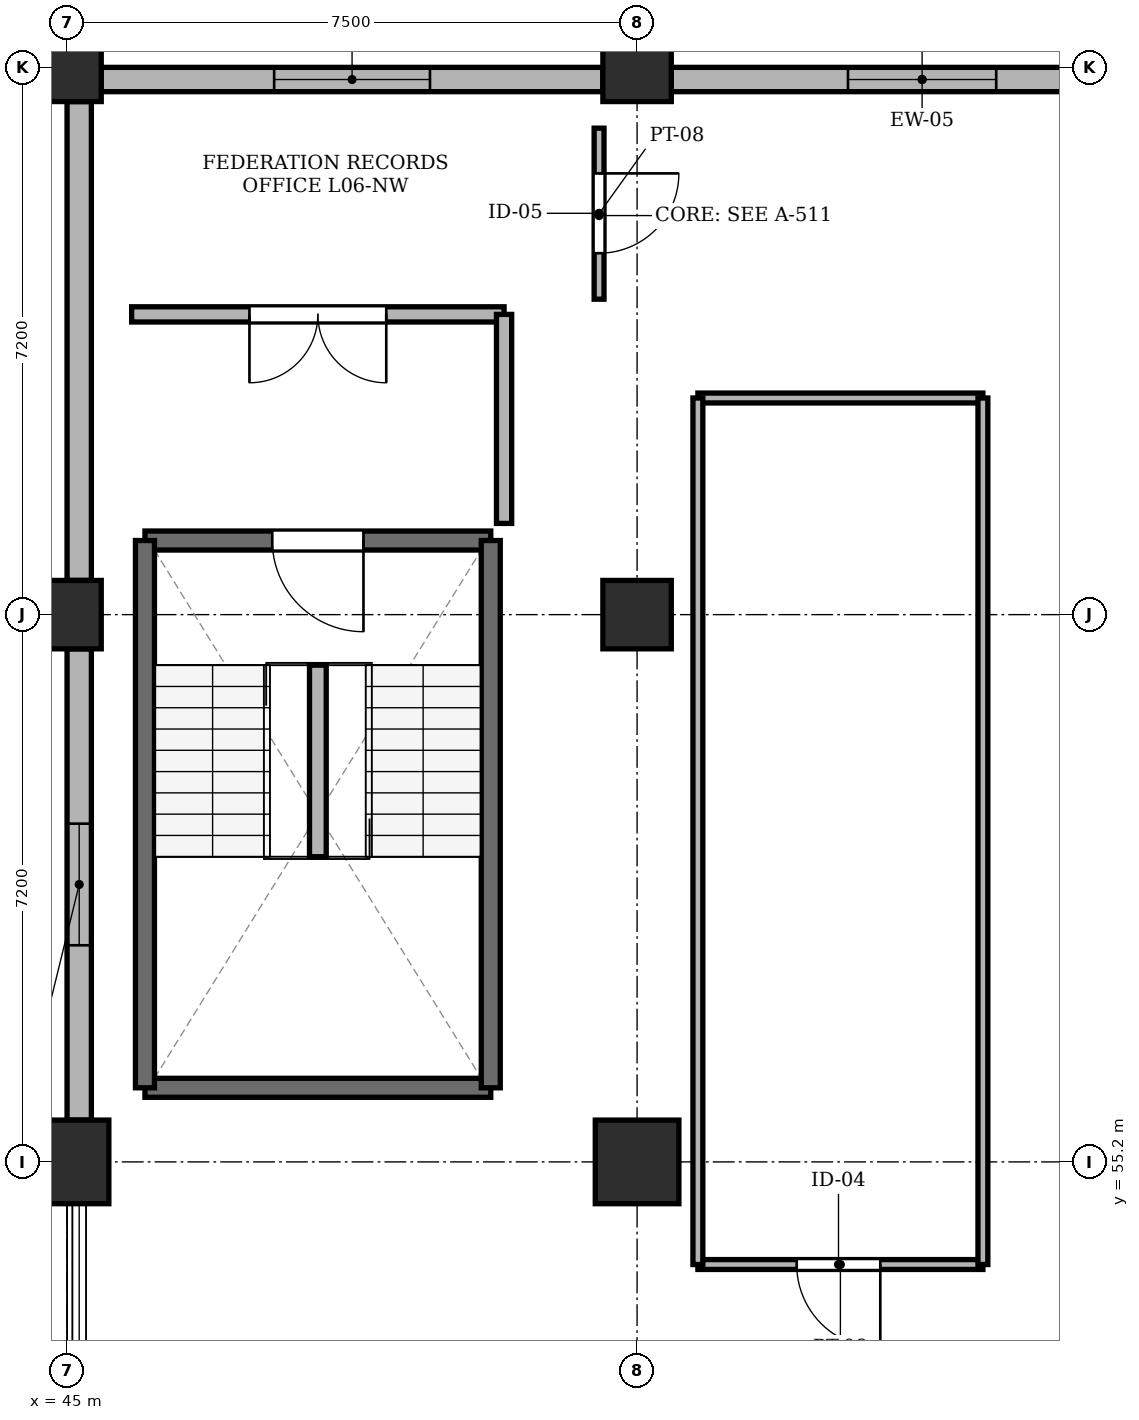
"""IFC4 building model, lengths in metres.
Left out: names, types, materials, properties, quantities, classifications, styles, units other than length and angle.
Written with IfcOpenShell. Run it as: python <this file> out.ifc"""

import sys

from ifc_helpers import new_model, si_unit, direction, frame, frame_2d, origin, origin_2d, place, context, subcontext, project, spatial, rectangle, extrude, element, fill, save


model = new_model("IFC4")
c1 = context("Model", 3, precision=1e-05, world=origin(), true_north=direction((0.0, 1.0)))
c2 = subcontext(c1, "Body", "Model", "MODEL_VIEW")
j1 = project(units=[si_unit("LENGTHUNIT", "METRE"), si_unit("PLANEANGLEUNIT", "RADIAN")], contexts=[c1])
p1 = place(None, origin())
s1 = spatial("IfcSite", under=j1, at=p1, CompositionType="ELEMENT")
p2 = place(p1, origin())
s2 = spatial("IfcBuilding", under=s1, at=p2, CompositionType="ELEMENT")
p3 = place(p2, frame((0.0, 0.0, 30.8)))
s3 = spatial("IfcBuildingStorey", under=s2, at=p3, CompositionType="ELEMENT", Elevation=30.8)
p4 = place(p3, frame((45.0, 55.2, -0.26), z_axis=(0.0, 0.0, 1.0), x_axis=(1.0, 0.0, 0.0)))
e1 = element("IfcColumn", 1, at=p4, inside=s3, PredefinedType="COLUMN", context=c2, shape_type="SweptSolid", body=[
    extrude(rectangle(XDim=1.1, YDim=1.1, at=origin_2d()), origin(), (0.0, 0.0, 1.0), 3.26),
])
for number, where, z_axis, x_axis in (
    (2, (45.0, 62.4, -0.26), (0.0, 0.0, 1.0), (1.0, 0.0, 0.0)),
    (3, (45.0, 69.6, -0.26), (0.0, 0.0, 1.0), (1.0, 0.0, 0.0)),
):
    element("IfcColumn", number, at=place(p3, frame(where, z_axis=z_axis, x_axis=x_axis)), inside=s3, PredefinedType="COLUMN", context=c2, shape_type="SweptSolid", body=[
        extrude(rectangle(XDim=0.9, YDim=0.9, at=origin_2d()), origin(), (0.0, 0.0, 1.0), 3.26),
    ])
p5 = place(p3, frame((52.5, 55.2, -0.26), z_axis=(0.0, 0.0, 1.0), x_axis=(1.0, 0.0, 0.0)))
e4 = element("IfcColumn", 4, at=p5, inside=s3, PredefinedType="COLUMN", context=c2, shape_type="SweptSolid", body=[
    extrude(rectangle(XDim=1.1, YDim=1.1, at=origin_2d()), origin(), (0.0, 0.0, 1.0), 3.26),
])
for number, where, z_axis, x_axis in (
    (5, (52.5, 62.4, -0.26), (0.0, 0.0, 1.0), (1.0, 0.0, 0.0)),
    (6, (52.5, 69.6, -0.26), (0.0, 0.0, 1.0), (1.0, 0.0, 0.0)),
):
    element("IfcColumn", number, at=place(p3, frame(where, z_axis=z_axis, x_axis=x_axis)), inside=s3, PredefinedType="COLUMN", context=c2, shape_type="SweptSolid", body=[
        extrude(rectangle(XDim=0.9, YDim=0.9, at=origin_2d()), origin(), (0.0, 0.0, 1.0), 3.26),
    ])
p6 = place(p3, frame((59.55, 69.44, 0.0), z_axis=(0.0, 0.0, 1.0), x_axis=(-1.0, 0.0, 0.0)))
e7 = element("IfcWall", 7, at=p6, inside=s3, PredefinedType="SOLIDWALL", context=c2, shape_type="SweptSolid", body=[
    extrude(rectangle(XDim=6.6, YDim=0.32, at=frame_2d((3.3, 0.0))), origin(), (0.0, 0.0, 1.0), 2.53),
])
p7 = place(p6, frame((2.325, 0.0, 0.62)))
e8 = element("IfcOpeningElement", 8, at=p7, cuts=e7, PredefinedType="OPENING", context=c2, shape_type="SweptSolid", body=[
    extrude(rectangle(XDim=1.95, YDim=1.81, at=frame_2d((0.975, 0.905))), frame((0.0, 0.172, 0.0), z_axis=(0.0, -1.0, 0.0), x_axis=(1.0, 0.0, 0.0)), (0.0, 0.0, 1.0), 0.344),
])
p8 = place(p3, frame((52.05, 69.44, 0.0), z_axis=(0.0, 0.0, 1.0), x_axis=(-1.0, 0.0, 0.0)))
e9 = element("IfcWall", 9, at=p8, inside=s3, PredefinedType="SOLIDWALL", context=c2, shape_type="SweptSolid", body=[
    extrude(rectangle(XDim=6.6, YDim=0.32, at=frame_2d((3.3, 0.0))), origin(), (0.0, 0.0, 1.0), 2.53),
])
p9 = place(p8, frame((2.275, 0.0, 0.62)))
e10 = element("IfcOpeningElement", 10, at=p9, cuts=e9, PredefinedType="OPENING", context=c2, shape_type="SweptSolid", body=[
    extrude(rectangle(XDim=2.05, YDim=1.81, at=frame_2d((1.025, 0.905))), frame((0.0, 0.172, 0.0), z_axis=(0.0, -1.0, 0.0), x_axis=(1.0, 0.0, 0.0)), (0.0, 0.0, 1.0), 0.344),
])
p10 = place(p3, frame((45.16, 69.15, 0.0), z_axis=(0.0, 0.0, 1.0), x_axis=(0.0, -1.0, 0.0)))
e11 = element("IfcWall", 11, at=p10, inside=s3, PredefinedType="SOLIDWALL", context=c2, shape_type="SweptSolid", body=[
    extrude(rectangle(XDim=6.3, YDim=0.32, at=frame_2d((3.15, 0.0))), origin(), (0.0, 0.0, 1.0), 2.53),
])
p11 = place(p3, frame((45.16, 61.95, 0.0), z_axis=(0.0, 0.0, 1.0), x_axis=(0.0, -1.0, 0.0)))
e12 = element("IfcWall", 12, at=p11, inside=s3, PredefinedType="SOLIDWALL", context=c2, shape_type="SweptSolid", body=[
    extrude(rectangle(XDim=6.2, YDim=0.32, at=frame_2d((3.1, 0.0))), origin(), (0.0, 0.0, 1.0), 2.53),
])
p12 = place(p11, frame((2.3, 0.0, 0.62)))
e13 = element("IfcOpeningElement", 13, at=p12, cuts=e12, PredefinedType="OPENING", context=c2, shape_type="SweptSolid", body=[
    extrude(rectangle(XDim=1.6, YDim=1.81, at=frame_2d((0.8, 0.905))), frame((0.0, 0.172, 0.0), z_axis=(0.0, -1.0, 0.0), x_axis=(1.0, 0.0, 0.0)), (0.0, 0.0, 1.0), 0.344),
])
p13 = place(p3, frame((46.025, 56.175, 0.0), z_axis=(0.0, 0.0, 1.0), x_axis=(1.0, 0.0, 0.0)))
e14 = element("IfcWall", 14, at=p13, inside=s3, PredefinedType="SHEAR", context=c2, shape_type="SweptSolid", body=[
    extrude(rectangle(XDim=4.55, YDim=0.25, at=frame_2d((2.275, 0.0))), origin(), (0.0, 0.0, 1.0), 3.0),
])
p14 = place(p3, frame((50.575, 63.375, 0.0), z_axis=(0.0, 0.0, 1.0), x_axis=(-1.0, 0.0, 0.0)))
e15 = element("IfcWall", 15, at=p14, inside=s3, PredefinedType="SHEAR", context=c2, shape_type="SweptSolid", body=[
    extrude(rectangle(XDim=4.55, YDim=0.25, at=frame_2d((2.275, 0.0))), origin(), (0.0, 0.0, 1.0), 3.0),
])
p15 = place(p14, frame((1.675, 0.0, 0.0)))
e16 = element("IfcOpeningElement", 16, at=p15, cuts=e15, PredefinedType="OPENING", context=c2, shape_type="SweptSolid", body=[
    extrude(rectangle(XDim=1.2, YDim=2.2, at=frame_2d((0.6, 1.1))), frame((0.0, 0.137, 0.0), z_axis=(0.0, -1.0, 0.0), x_axis=(1.0, 0.0, 0.0)), (0.0, 0.0, 1.0), 0.274),
])
for number, where, z_axis, x_axis in (
    (17, (46.025, 63.375, 0.0), (0.0, 0.0, 1.0), (0.0, -1.0, 0.0)),
    (18, (50.575, 56.175, 0.0), (0.0, 0.0, 1.0), (0.0, 1.0, 0.0)),
):
    element("IfcWall", number, at=place(p3, frame(where, z_axis=z_axis, x_axis=x_axis)), inside=s3, PredefinedType="SHEAR", context=c2, shape_type="SweptSolid", body=[
        extrude(rectangle(XDim=7.2, YDim=0.25, at=frame_2d((3.6, 0.0))), origin(), (0.0, 0.0, 1.0), 3.0),
    ])
p16 = place(p3, frame((48.3, 59.215, 0.0), z_axis=(0.0, 0.0, 1.0), x_axis=(0.0, 1.0, 0.0)))
e19 = element("IfcWall", 19, at=p16, inside=s3, PredefinedType="PARTITIONING", context=c2, shape_type="SweptSolid", body=[
    extrude(rectangle(XDim=2.52, YDim=0.22, at=frame_2d((1.26, 0.0))), origin(), (0.0, 0.0, 1.0), 3.0),
])
p17 = place(p3, frame((45.85, 66.35, 0.0), z_axis=(0.0, 0.0, 1.0), x_axis=(1.0, 0.0, 0.0)))
e20 = element("IfcWall", 20, at=p17, inside=s3, PredefinedType="PARTITIONING", context=c2, shape_type="SweptSolid", body=[
    extrude(rectangle(XDim=4.9, YDim=0.2, at=frame_2d((2.45, 0.0))), origin(), (0.0, 0.0, 1.0), 2.53),
])
p18 = place(p17, frame((1.55, 0.0, 0.0)))
e21 = element("IfcOpeningElement", 21, at=p18, cuts=e20, PredefinedType="OPENING", context=c2, shape_type="SweptSolid", body=[
    extrude(rectangle(XDim=1.8, YDim=2.2, at=frame_2d((0.9, 1.1))), frame((0.0, 0.112, 0.0), z_axis=(0.0, -1.0, 0.0), x_axis=(1.0, 0.0, 0.0)), (0.0, 0.0, 1.0), 0.224),
])
p19 = place(p3, frame((50.75, 63.6, 0.0), z_axis=(0.0, 0.0, 1.0), x_axis=(0.0, 1.0, 0.0)))
e22 = element("IfcWall", 22, at=p19, inside=s3, PredefinedType="PARTITIONING", context=c2, shape_type="SweptSolid", body=[
    extrude(rectangle(XDim=2.75, YDim=0.2, at=frame_2d((1.375, 0.0))), origin(), (0.0, 0.0, 1.0), 2.53),
])
p20 = place(p3, frame((53.3, 53.85, 0.0), z_axis=(0.0, 0.0, 1.0), x_axis=(1.0, 0.0, 0.0)))
e23 = element("IfcWall", 23, at=p20, inside=s3, PredefinedType="PARTITIONING", context=c2, shape_type="SweptSolid", body=[
    extrude(rectangle(XDim=3.75, YDim=0.13, at=frame_2d((1.875, 0.0))), origin(), (0.0, 0.0, 1.0), 2.53),
])
p21 = place(p20, frame((1.3, 0.0, 0.0)))
e24 = element("IfcOpeningElement", 24, at=p21, cuts=e23, PredefinedType="OPENING", context=c2, shape_type="SweptSolid", body=[
    extrude(rectangle(XDim=1.1, YDim=2.15, at=frame_2d((0.55, 1.075))), frame((0.0, 0.077, 0.0), z_axis=(0.0, -1.0, 0.0), x_axis=(1.0, 0.0, 0.0)), (0.0, 0.0, 1.0), 0.154),
])
p22 = place(p3, frame((53.3, 65.25, 0.0), z_axis=(0.0, 0.0, 1.0), x_axis=(1.0, 0.0, 0.0)))
e25 = element("IfcWall", 25, at=p22, inside=s3, PredefinedType="PARTITIONING", context=c2, shape_type="SweptSolid", body=[
    extrude(rectangle(XDim=3.75, YDim=0.13, at=frame_2d((1.875, 0.0))), origin(), (0.0, 0.0, 1.0), 2.53),
])
for number, where, z_axis, x_axis in (
    (26, (53.3, 53.85, 0.0), (0.0, 0.0, 1.0), (0.0, 1.0, 0.0)),
    (27, (57.05, 53.85, 0.0), (0.0, 0.0, 1.0), (0.0, 1.0, 0.0)),
):
    element("IfcWall", number, at=place(p3, frame(where, z_axis=z_axis, x_axis=x_axis)), inside=s3, PredefinedType="PARTITIONING", context=c2, shape_type="SweptSolid", body=[
        extrude(rectangle(XDim=11.4, YDim=0.13, at=frame_2d((5.7, 0.0))), origin(), (0.0, 0.0, 1.0), 2.53),
    ])
p23 = place(p3, frame((52.0, 66.55, 0.0), z_axis=(0.0, 0.0, 1.0), x_axis=(0.0, 1.0, 0.0)))
e28 = element("IfcWall", 28, at=p23, inside=s3, PredefinedType="PARTITIONING", context=c2, shape_type="SweptSolid", body=[
    extrude(rectangle(XDim=2.25, YDim=0.13, at=frame_2d((1.125, 0.0))), origin(), (0.0, 0.0, 1.0), 2.53),
])
p24 = place(p23, frame((0.605, 0.0, 0.0)))
e29 = element("IfcOpeningElement", 29, at=p24, cuts=e28, PredefinedType="OPENING", context=c2, shape_type="SweptSolid", body=[
    extrude(rectangle(XDim=1.05, YDim=2.15, at=frame_2d((0.525, 1.075))), frame((0.0, 0.077, 0.0), z_axis=(0.0, -1.0, 0.0), x_axis=(1.0, 0.0, 0.0)), (0.0, 0.0, 1.0), 0.154),
])
p25 = place(p7, origin())
e30 = element("IfcWindow", 30, at=p25, inside=s3, PartitioningType="SINGLE_PANEL", PredefinedType="WINDOW", context=c2, shape_type="SweptSolid", body=[
    extrude(rectangle(XDim=1.95, YDim=1.81, at=frame_2d((0.975, 0.905))), frame((0.0, 0.03, 0.0), z_axis=(0.0, -1.0, 0.0), x_axis=(1.0, 0.0, 0.0)), (0.0, 0.0, 1.0), 0.06),
])
fill(e8, e30)
p26 = place(p9, origin())
e31 = element("IfcWindow", 31, at=p26, inside=s3, PartitioningType="SINGLE_PANEL", PredefinedType="WINDOW", context=c2, shape_type="SweptSolid", body=[
    extrude(rectangle(XDim=2.05, YDim=1.81, at=frame_2d((1.025, 0.905))), frame((0.0, 0.03, 0.0), z_axis=(0.0, -1.0, 0.0), x_axis=(1.0, 0.0, 0.0)), (0.0, 0.0, 1.0), 0.06),
])
fill(e10, e31)
p27 = place(p12, origin())
e32 = element("IfcWindow", 32, at=p27, inside=s3, PartitioningType="SINGLE_PANEL", PredefinedType="WINDOW", context=c2, shape_type="SweptSolid", body=[
    extrude(rectangle(XDim=1.6, YDim=1.81, at=frame_2d((0.8, 0.905))), frame((0.0, 0.03, 0.0), z_axis=(0.0, -1.0, 0.0), x_axis=(1.0, 0.0, 0.0)), (0.0, 0.0, 1.0), 0.06),
])
fill(e13, e32)
p28 = place(p15, origin())
e33 = element("IfcDoor", 33, at=p28, inside=s3, OperationType="SINGLE_SWING_LEFT", PredefinedType="DOOR", context=c2, shape_type="SweptSolid", body=[
    extrude(rectangle(XDim=1.2, YDim=2.2, at=frame_2d((0.6, 1.1))), frame((0.0, 0.025, 0.0), z_axis=(0.0, -1.0, 0.0), x_axis=(1.0, 0.0, 0.0)), (0.0, 0.0, 1.0), 0.05),
])
fill(e16, e33)
p29 = place(p18, frame((1.8, 0.0, 0.0), z_axis=(0.0, 0.0, 1.0), x_axis=(-1.0, 0.0, 0.0)))
e34 = element("IfcDoor", 34, at=p29, inside=s3, OperationType="DOUBLE_DOOR_SINGLE_SWING", PredefinedType="DOOR", context=c2, shape_type="SweptSolid", body=[
    extrude(rectangle(XDim=1.8, YDim=2.2, at=frame_2d((0.9, 1.1))), frame((0.0, 0.025, 0.0), z_axis=(0.0, -1.0, 0.0), x_axis=(1.0, 0.0, 0.0)), (0.0, 0.0, 1.0), 0.05),
])
fill(e21, e34)
p30 = place(p21, frame((1.1, 0.0, 0.0), z_axis=(0.0, 0.0, 1.0), x_axis=(-1.0, 0.0, 0.0)))
e35 = element("IfcDoor", 35, at=p30, inside=s3, OperationType="SINGLE_SWING_RIGHT", PredefinedType="DOOR", context=c2, shape_type="SweptSolid", body=[
    extrude(rectangle(XDim=1.1, YDim=2.15, at=frame_2d((0.55, 1.075))), frame((0.0, 0.025, 0.0), z_axis=(0.0, -1.0, 0.0), x_axis=(1.0, 0.0, 0.0)), (0.0, 0.0, 1.0), 0.05),
])
fill(e24, e35)
p31 = place(p24, frame((1.05, 0.0, 0.0), z_axis=(0.0, 0.0, 1.0), x_axis=(-1.0, 0.0, 0.0)))
e36 = element("IfcDoor", 36, at=p31, inside=s3, OperationType="SINGLE_SWING_RIGHT", PredefinedType="DOOR", context=c2, shape_type="SweptSolid", body=[
    extrude(rectangle(XDim=1.05, YDim=2.15, at=frame_2d((0.525, 1.075))), frame((0.0, 0.025, 0.0), z_axis=(0.0, -1.0, 0.0), x_axis=(1.0, 0.0, 0.0)), (0.0, 0.0, 1.0), 0.05),
])
fill(e29, e36)
save(model, sys.argv[1])
